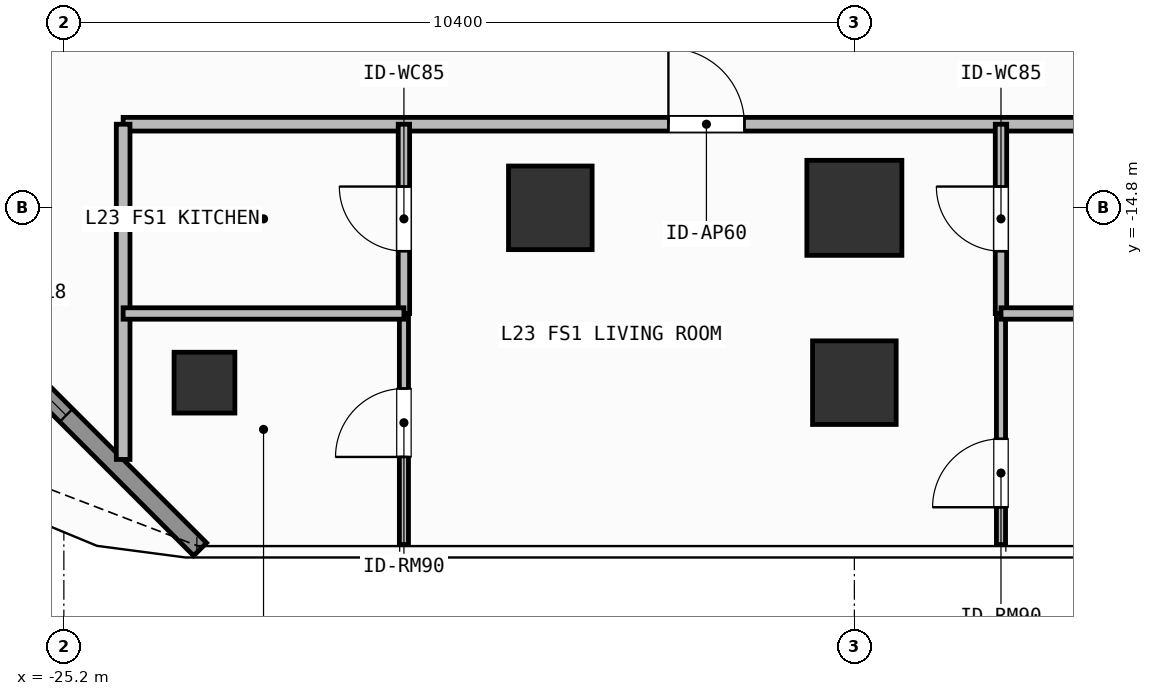
"""IFC4 building model, lengths in metres.
Left out: names, types, materials, properties, quantities, classifications, styles, units other than length and angle.
Written with IfcOpenShell. Run it as: python <this file> out.ifc"""

import sys

from ifc_helpers import new_model, si_unit, direction, frame, frame_2d, origin, origin_2d, place, context, subcontext, project, spatial, rectangle, hollow_rectangle, extrude, element, fill, save


model = new_model("IFC4")
c1 = context("Model", 3, precision=1e-05, world=origin(), true_north=direction((0.0, 1.0)))
c2 = subcontext(c1, "Body", "Model", "MODEL_VIEW")
j1 = project(units=[si_unit("LENGTHUNIT", "METRE"), si_unit("PLANEANGLEUNIT", "RADIAN")], contexts=[c1])
p1 = place(None, origin())
s1 = spatial("IfcSite", under=j1, at=p1, CompositionType="ELEMENT")
p2 = place(p1, origin())
s2 = spatial("IfcBuilding", under=s1, at=p2, CompositionType="ELEMENT")
p3 = place(p2, frame((0.0, 0.0, 93.0)))
s3 = spatial("IfcBuildingStorey", under=s2, at=p3, CompositionType="ELEMENT", Elevation=93.0)
p4 = place(p3, frame((-14.8, -14.8, 0.0), z_axis=(0.0, 0.0, 1.0), x_axis=(1.0, 0.0, 0.0)))
e1 = element("IfcColumn", 1, at=p4, inside=s3, PredefinedType="COLUMN", context=c2, shape_type="SweptSolid", body=[
    extrude(rectangle(XDim=1.25, YDim=1.25, at=origin_2d()), origin(), (0.0, 0.0, 1.0), 3.9),
])
for number, where, z_axis, x_axis in (
    (2, (-18.8, -14.8, 0.0), (0.0, 0.0, 1.0), (1.0, 0.0, 0.0)),
    (3, (-14.8, -17.1, 0.0), (0.0, 0.0, 1.0), (1.0, 0.0, 0.0)),
):
    element("IfcColumn", number, at=place(p3, frame(where, z_axis=z_axis, x_axis=x_axis)), inside=s3, PredefinedType="COLUMN", context=c2, shape_type="SweptSolid", body=[
        extrude(rectangle(XDim=1.1, YDim=1.1, at=origin_2d()), origin(), (0.0, 0.0, 1.0), 3.9),
    ])
p5 = place(p3, frame((-23.35, -17.1, 0.0), z_axis=(0.0, 0.0, 1.0), x_axis=(1.0, 0.0, 0.0)))
e4 = element("IfcColumn", 4, at=p5, inside=s3, PredefinedType="COLUMN", context=c2, shape_type="SweptSolid", body=[
    extrude(hollow_rectangle(XDim=0.8, YDim=0.8, WallThickness=0.036, at=origin_2d()), origin(), (0.0, 0.0, 1.0), 3.9),
])
p6 = place(p3, frame((-23.408, -19.292, 0.0), z_axis=(0.0, 0.0, 1.0), x_axis=(-0.707087954376, 0.707125607496, 0.0)))
e5 = element("IfcWall", 5, at=p6, inside=s3, PredefinedType="SOLIDWALL", context=c2, shape_type="SweptSolid", body=[
    extrude(rectangle(XDim=6.484, YDim=0.24, at=frame_2d((3.242, 0.0))), origin(), (0.0, 0.0, 1.0), 3.68),
])
p7 = place(p6, frame((2.492, 0.0, 0.8)))
e6 = element("IfcOpeningElement", 6, at=p7, cuts=e5, PredefinedType="OPENING", context=c2, shape_type="SweptSolid", body=[
    extrude(rectangle(XDim=1.5, YDim=1.85, at=frame_2d((0.75, 0.925))), frame((0.0, 0.13, 0.0), z_axis=(0.0, -1.0, 0.0), x_axis=(1.0, 0.0, 0.0)), (0.0, 0.0, 1.0), 0.26),
])
p8 = place(p3, frame((-24.42, -13.7, 0.0), z_axis=(0.0, 0.0, 1.0), x_axis=(1.0, 0.0, 0.0)))
e7 = element("IfcWall", 7, at=p8, inside=s3, PredefinedType="PARTITIONING", context=c2, shape_type="SweptSolid", body=[
    extrude(rectangle(XDim=16.786, YDim=0.18, at=frame_2d((8.393, 0.0))), origin(), (0.0, 0.0, 1.0), 3.68),
])
p9 = place(p8, frame((7.174, 0.0, 0.0)))
e8 = element("IfcOpeningElement", 8, at=p9, cuts=e7, PredefinedType="OPENING", context=c2, shape_type="SweptSolid", body=[
    extrude(rectangle(XDim=1.0, YDim=2.2, at=frame_2d((0.5, 1.1))), frame((0.0, 0.1, 0.0), z_axis=(0.0, -1.0, 0.0), x_axis=(1.0, 0.0, 0.0)), (0.0, 0.0, 1.0), 0.2),
])
p10 = place(p3, frame((-20.726, -16.19, 0.0), z_axis=(0.0, 0.0, 1.0), x_axis=(0.0, 1.0, 0.0)))
e9 = element("IfcWall", 9, at=p10, inside=s3, PredefinedType="PARTITIONING", context=c2, shape_type="SweptSolid", body=[
    extrude(rectangle(XDim=2.49, YDim=0.15, at=frame_2d((1.245, 0.0))), origin(), (0.0, 0.0, 1.0), 3.68),
])
p11 = place(p10, frame((0.82, 0.0, 0.0)))
e10 = element("IfcOpeningElement", 10, at=p11, cuts=e9, PredefinedType="OPENING", context=c2, shape_type="SweptSolid", body=[
    extrude(rectangle(XDim=0.85, YDim=2.1, at=frame_2d((0.425, 1.05))), frame((0.0, 0.085, 0.0), z_axis=(0.0, -1.0, 0.0), x_axis=(1.0, 0.0, 0.0)), (0.0, 0.0, 1.0), 0.17),
])
p12 = place(p3, frame((-20.726, -19.23, 0.0), z_axis=(0.0, 0.0, 1.0), x_axis=(0.0, 1.0, 0.0)))
e11 = element("IfcWall", 11, at=p12, inside=s3, PredefinedType="PARTITIONING", context=c2, shape_type="SweptSolid", body=[
    extrude(rectangle(XDim=3.04, YDim=0.12, at=frame_2d((1.52, 0.0))), origin(), (0.0, 0.0, 1.0), 3.68),
])
p13 = place(p12, frame((1.153, 0.0, 0.0)))
e12 = element("IfcOpeningElement", 12, at=p13, cuts=e11, PredefinedType="OPENING", context=c2, shape_type="SweptSolid", body=[
    extrude(rectangle(XDim=0.9, YDim=2.1, at=frame_2d((0.45, 1.05))), frame((0.0, 0.07, 0.0), z_axis=(0.0, -1.0, 0.0), x_axis=(1.0, 0.0, 0.0)), (0.0, 0.0, 1.0), 0.14),
])
p14 = place(p3, frame((-12.871, -16.19, 0.0), z_axis=(0.0, 0.0, 1.0), x_axis=(0.0, 1.0, 0.0)))
e13 = element("IfcWall", 13, at=p14, inside=s3, PredefinedType="PARTITIONING", context=c2, shape_type="SweptSolid", body=[
    extrude(rectangle(XDim=2.49, YDim=0.15, at=frame_2d((1.245, 0.0))), origin(), (0.0, 0.0, 1.0), 3.68),
])
p15 = place(p14, frame((0.82, 0.0, 0.0)))
e14 = element("IfcOpeningElement", 14, at=p15, cuts=e13, PredefinedType="OPENING", context=c2, shape_type="SweptSolid", body=[
    extrude(rectangle(XDim=0.85, YDim=2.1, at=frame_2d((0.425, 1.05))), frame((0.0, 0.085, 0.0), z_axis=(0.0, -1.0, 0.0), x_axis=(1.0, 0.0, 0.0)), (0.0, 0.0, 1.0), 0.17),
])
p16 = place(p3, frame((-12.871, -19.23, 0.0), z_axis=(0.0, 0.0, 1.0), x_axis=(0.0, 1.0, 0.0)))
e15 = element("IfcWall", 15, at=p16, inside=s3, PredefinedType="PARTITIONING", context=c2, shape_type="SweptSolid", body=[
    extrude(rectangle(XDim=3.04, YDim=0.12, at=frame_2d((1.52, 0.0))), origin(), (0.0, 0.0, 1.0), 3.68),
])
p17 = place(p16, frame((0.491, 0.0, 0.0)))
e16 = element("IfcOpeningElement", 16, at=p17, cuts=e15, PredefinedType="OPENING", context=c2, shape_type="SweptSolid", body=[
    extrude(rectangle(XDim=0.9, YDim=2.1, at=frame_2d((0.45, 1.05))), frame((0.0, 0.07, 0.0), z_axis=(0.0, -1.0, 0.0), x_axis=(1.0, 0.0, 0.0)), (0.0, 0.0, 1.0), 0.14),
])
p18 = place(p3, frame((-24.42, -18.11, 0.0), z_axis=(0.0, 0.0, 1.0), x_axis=(0.0, 1.0, 0.0)))
e17 = element("IfcWall", 17, at=p18, inside=s3, PredefinedType="PARTITIONING", context=c2, shape_type="SweptSolid", body=[
    extrude(rectangle(XDim=4.41, YDim=0.18, at=frame_2d((2.205, 0.0))), origin(), (0.0, 0.0, 1.0), 3.68),
])
p19 = place(p3, frame((-24.42, -16.19, 0.0), z_axis=(0.0, 0.0, 1.0), x_axis=(1.0, 0.0, 0.0)))
e18 = element("IfcWall", 18, at=p19, inside=s3, PredefinedType="PARTITIONING", context=c2, shape_type="SweptSolid", body=[
    extrude(rectangle(XDim=3.694, YDim=0.15, at=frame_2d((1.847, 0.0))), origin(), (0.0, 0.0, 1.0), 3.68),
])
p20 = place(p3, frame((-12.871, -16.19, 0.0), z_axis=(0.0, 0.0, 1.0), x_axis=(1.0, 0.0, 0.0)))
e19 = element("IfcWall", 19, at=p20, inside=s3, PredefinedType="PARTITIONING", context=c2, shape_type="SweptSolid", body=[
    extrude(rectangle(XDim=5.237, YDim=0.15, at=frame_2d((2.619, 0.0))), origin(), (0.0, 0.0, 1.0), 3.68),
])
p21 = place(p7, origin())
e20 = element("IfcWindow", 20, at=p21, inside=s3, PartitioningType="SINGLE_PANEL", PredefinedType="WINDOW", context=c2, shape_type="SweptSolid", body=[
    extrude(rectangle(XDim=1.5, YDim=1.85, at=frame_2d((0.75, 0.925))), frame((0.0, 0.03, 0.0), z_axis=(0.0, -1.0, 0.0), x_axis=(1.0, 0.0, 0.0)), (0.0, 0.0, 1.0), 0.06),
])
fill(e6, e20)
p22 = place(p9, origin())
e21 = element("IfcDoor", 21, at=p22, inside=s3, OperationType="SINGLE_SWING_LEFT", PredefinedType="DOOR", context=c2, shape_type="SweptSolid", body=[
    extrude(rectangle(XDim=1.0, YDim=2.2, at=frame_2d((0.5, 1.1))), frame((0.0, 0.025, 0.0), z_axis=(0.0, -1.0, 0.0), x_axis=(1.0, 0.0, 0.0)), (0.0, 0.0, 1.0), 0.05),
])
fill(e8, e21)
p23 = place(p11, origin())
e22 = element("IfcDoor", 22, at=p23, inside=s3, OperationType="SINGLE_SWING_RIGHT", PredefinedType="DOOR", context=c2, shape_type="SweptSolid", body=[
    extrude(rectangle(XDim=0.85, YDim=2.1, at=frame_2d((0.425, 1.05))), frame((0.0, 0.025, 0.0), z_axis=(0.0, -1.0, 0.0), x_axis=(1.0, 0.0, 0.0)), (0.0, 0.0, 1.0), 0.05),
])
fill(e10, e22)
p24 = place(p13, origin())
e23 = element("IfcDoor", 23, at=p24, inside=s3, OperationType="SINGLE_SWING_LEFT", PredefinedType="DOOR", context=c2, shape_type="SweptSolid", body=[
    extrude(rectangle(XDim=0.9, YDim=2.1, at=frame_2d((0.45, 1.05))), frame((0.0, 0.025, 0.0), z_axis=(0.0, -1.0, 0.0), x_axis=(1.0, 0.0, 0.0)), (0.0, 0.0, 1.0), 0.05),
])
fill(e12, e23)
p25 = place(p15, origin())
e24 = element("IfcDoor", 24, at=p25, inside=s3, OperationType="SINGLE_SWING_RIGHT", PredefinedType="DOOR", context=c2, shape_type="SweptSolid", body=[
    extrude(rectangle(XDim=0.85, YDim=2.1, at=frame_2d((0.425, 1.05))), frame((0.0, 0.025, 0.0), z_axis=(0.0, -1.0, 0.0), x_axis=(1.0, 0.0, 0.0)), (0.0, 0.0, 1.0), 0.05),
])
fill(e14, e24)
p26 = place(p17, origin())
e25 = element("IfcDoor", 25, at=p26, inside=s3, OperationType="SINGLE_SWING_LEFT", PredefinedType="DOOR", context=c2, shape_type="SweptSolid", body=[
    extrude(rectangle(XDim=0.9, YDim=2.1, at=frame_2d((0.45, 1.05))), frame((0.0, 0.025, 0.0), z_axis=(0.0, -1.0, 0.0), x_axis=(1.0, 0.0, 0.0)), (0.0, 0.0, 1.0), 0.05),
])
fill(e16, e25)
save(model, sys.argv[1])
